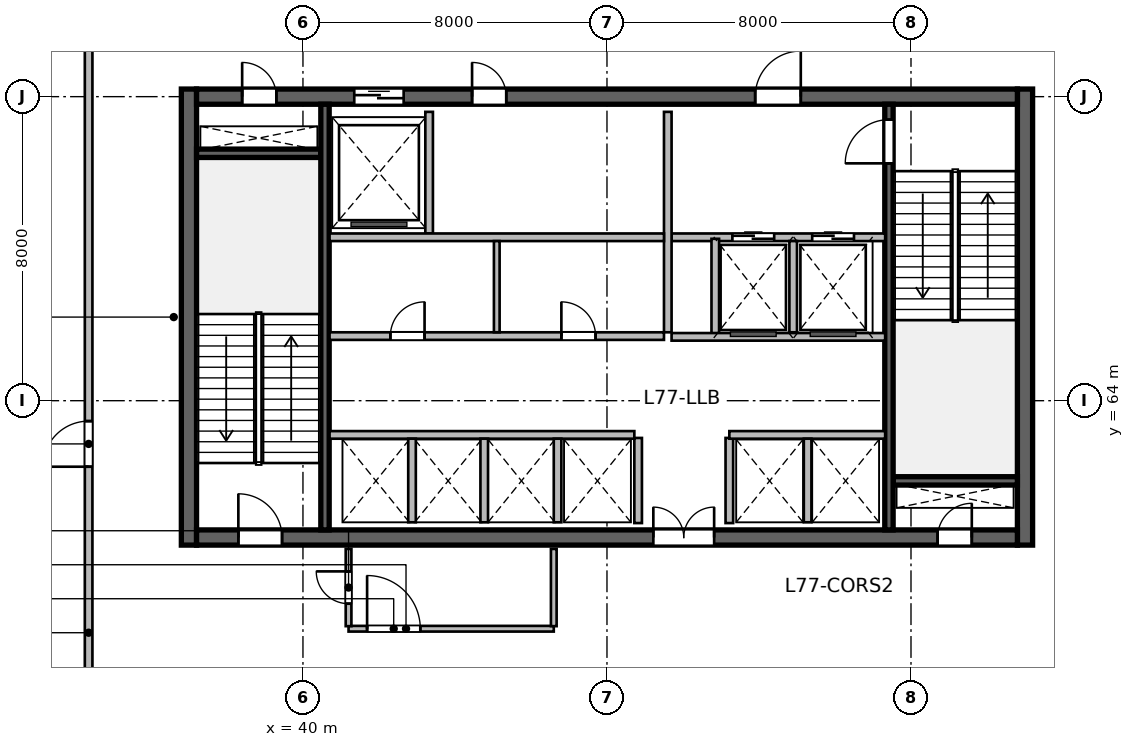
"""IFC4 building model, lengths in metres.
Left out: names, types, materials, properties, quantities, classifications, styles, units other than length and angle.
Written with IfcOpenShell. Run it as: python <this file> out.ifc"""

import sys

from ifc_helpers import new_model, si_unit, direction, frame, frame_2d, origin, place, context, subcontext, project, spatial, rectangle, extrude, source, transform, mapped, element, fill, save


model = new_model("IFC4")
c1 = context("Model", 3, precision=1e-05, world=origin(), true_north=direction((0.0, 1.0)))
c2 = subcontext(c1, "Body", "Model", "MODEL_VIEW")
j1 = project(units=[si_unit("LENGTHUNIT", "METRE"), si_unit("PLANEANGLEUNIT", "RADIAN")], contexts=[c1])
p1 = place(None, origin())
s1 = spatial("IfcSite", under=j1, at=p1, CompositionType="ELEMENT")
p2 = place(p1, origin())
s2 = spatial("IfcBuilding", under=s1, at=p2, CompositionType="ELEMENT")
p3 = place(p2, frame((0.0, 0.0, 318.0)))
s3 = spatial("IfcBuildingStorey", under=s2, at=p3, CompositionType="ELEMENT", Elevation=318.0)
m1 = source(origin(), c2, "Body", "SweptSolid", [
    extrude(rectangle(XDim=12.0, YDim=0.4, at=frame_2d((6.0, 0.0))), origin(), (0.0, 0.0, 1.0), 5.4),
])
for number, where, z_axis, x_axis in (
    (1, (37.0, 60.2, 0.0), (0.0, 0.0, 1.0), (0.0, 1.0, 0.0)),
    (2, (59.0, 60.2, 0.0), (0.0, 0.0, 1.0), (0.0, 1.0, 0.0)),
):
    element("IfcWall", number, at=place(p3, frame(where, z_axis=z_axis, x_axis=x_axis)), inside=s3, PredefinedType="SHEAR", context=c2, shape_type="MappedRepresentation", body=[
        mapped(m1, transform((0.0, 0.0, 0.0), scale=1.0)),
    ])
m2 = source(origin(), c2, "Body", "SweptSolid", [
    extrude(rectangle(XDim=21.6, YDim=0.4, at=frame_2d((10.8, 0.0))), origin(), (0.0, 0.0, 1.0), 5.4),
])
p4 = place(p3, frame((37.2, 60.4, 0.0), z_axis=(0.0, 0.0, 1.0), x_axis=(1.0, 0.0, 0.0)))
e3 = element("IfcWall", 3, at=p4, inside=s3, PredefinedType="SHEAR", context=c2, shape_type="MappedRepresentation", body=[
    mapped(m2, transform((0.0, 0.0, 0.0), scale=1.0)),
])
p5 = place(p4, frame((1.1, 0.0, 0.0)))
e4 = element("IfcOpeningElement", 4, at=p5, cuts=e3, PredefinedType="OPENING", context=c2, shape_type="SweptSolid", body=[
    extrude(rectangle(XDim=1.15, YDim=2.15, at=frame_2d((0.575, 1.075))), frame((0.0, 0.21, 0.0), z_axis=(0.0, -1.0, 0.0), x_axis=(1.0, 0.0, 0.0)), (0.0, 0.0, 1.0), 0.42),
])
p6 = place(p4, frame((19.5, 0.0, 0.0)))
e5 = element("IfcOpeningElement", 5, at=p6, cuts=e3, PredefinedType="OPENING", context=c2, shape_type="SweptSolid", body=[
    extrude(rectangle(XDim=0.9, YDim=2.1, at=frame_2d((0.45, 1.05))), frame((0.0, 0.21, 0.0), z_axis=(0.0, -1.0, 0.0), x_axis=(1.0, 0.0, 0.0)), (0.0, 0.0, 1.0), 0.42),
])
p7 = place(p4, frame((12.02, 0.0, 0.0)))
e6 = element("IfcOpeningElement", 6, at=p7, cuts=e3, PredefinedType="OPENING", context=c2, shape_type="SweptSolid", body=[
    extrude(rectangle(XDim=1.6, YDim=2.15, at=frame_2d((0.8, 1.075))), frame((0.0, 0.21, 0.0), z_axis=(0.0, -1.0, 0.0), x_axis=(1.0, 0.0, 0.0)), (0.0, 0.0, 1.0), 0.42),
])
p8 = place(p3, frame((37.2, 72.0, 0.0), z_axis=(0.0, 0.0, 1.0), x_axis=(1.0, 0.0, 0.0)))
e7 = element("IfcWall", 7, at=p8, inside=s3, PredefinedType="SHEAR", context=c2, shape_type="MappedRepresentation", body=[
    mapped(m2, transform((0.0, 0.0, 0.0), scale=1.0)),
])
p9 = place(p8, frame((1.2, 0.0, 0.0)))
e8 = element("IfcOpeningElement", 8, at=p9, cuts=e7, PredefinedType="OPENING", context=c2, shape_type="SweptSolid", body=[
    extrude(rectangle(XDim=0.9, YDim=2.1, at=frame_2d((0.45, 1.05))), frame((0.0, 0.21, 0.0), z_axis=(0.0, -1.0, 0.0), x_axis=(1.0, 0.0, 0.0)), (0.0, 0.0, 1.0), 0.42),
])
p10 = place(p8, frame((14.7, 0.0, 0.0)))
e9 = element("IfcOpeningElement", 9, at=p10, cuts=e7, PredefinedType="OPENING", context=c2, shape_type="SweptSolid", body=[
    extrude(rectangle(XDim=1.2, YDim=2.15, at=frame_2d((0.6, 1.075))), frame((0.0, 0.21, 0.0), z_axis=(0.0, -1.0, 0.0), x_axis=(1.0, 0.0, 0.0)), (0.0, 0.0, 1.0), 0.42),
])
p11 = place(p8, frame((4.15, 0.0, 0.0)))
e10 = element("IfcOpeningElement", 10, at=p11, cuts=e7, PredefinedType="OPENING", context=c2, shape_type="SweptSolid", body=[
    extrude(rectangle(XDim=1.3, YDim=2.15, at=frame_2d((0.65, 1.075))), frame((0.0, 0.21, 0.0), z_axis=(0.0, -1.0, 0.0), x_axis=(1.0, 0.0, 0.0)), (0.0, 0.0, 1.0), 0.42),
])
p12 = place(p8, frame((7.25, 0.0, 0.0)))
e11 = element("IfcOpeningElement", 11, at=p12, cuts=e7, PredefinedType="OPENING", context=c2, shape_type="SweptSolid", body=[
    extrude(rectangle(XDim=0.9, YDim=2.1, at=frame_2d((0.45, 1.05))), frame((0.0, 0.21, 0.0), z_axis=(0.0, -1.0, 0.0), x_axis=(1.0, 0.0, 0.0)), (0.0, 0.0, 1.0), 0.42),
])
m3 = source(origin(), c2, "Body", "SweptSolid", [
    extrude(rectangle(XDim=3.27, YDim=0.22, at=frame_2d((1.635, 0.0))), origin(), (0.0, 0.0, 1.0), 5.4),
])
for number, where, z_axis, x_axis in (
    (12, (37.2, 70.51, 0.0), (0.0, 0.0, 1.0), (1.0, 0.0, 0.0)),
    (13, (55.53, 61.89, 0.0), (0.0, 0.0, 1.0), (1.0, 0.0, 0.0)),
):
    element("IfcWall", number, at=place(p3, frame(where, z_axis=z_axis, x_axis=x_axis)), inside=s3, PredefinedType="SHEAR", context=c2, shape_type="MappedRepresentation", body=[
        mapped(m3, transform((0.0, 0.0, 0.0), scale=1.0)),
    ])
m4 = source(origin(), c2, "Body", "SweptSolid", [
    extrude(rectangle(XDim=11.2, YDim=0.22, at=frame_2d((5.6, 0.0))), origin(), (0.0, 0.0, 1.0), 5.4),
])
p13 = place(p3, frame((40.58, 60.6, 0.0), z_axis=(0.0, 0.0, 1.0), x_axis=(0.0, 1.0, 0.0)))
e14 = element("IfcWall", 14, at=p13, inside=s3, PredefinedType="SHEAR", context=c2, shape_type="MappedRepresentation", body=[
    mapped(m4, transform((0.0, 0.0, 0.0), scale=1.0)),
])
p14 = place(p3, frame((55.42, 60.6, 0.0), z_axis=(0.0, 0.0, 1.0), x_axis=(0.0, 1.0, 0.0)))
e15 = element("IfcWall", 15, at=p14, inside=s3, PredefinedType="SHEAR", context=c2, shape_type="MappedRepresentation", body=[
    mapped(m4, transform((0.0, 0.0, 0.0), scale=1.0)),
])
p15 = place(p14, frame((9.645, 0.0, 0.0)))
e16 = element("IfcOpeningElement", 16, at=p15, cuts=e15, PredefinedType="OPENING", context=c2, shape_type="SweptSolid", body=[
    extrude(rectangle(XDim=1.15, YDim=2.15, at=frame_2d((0.575, 1.075))), frame((0.0, 0.12, 0.0), z_axis=(0.0, -1.0, 0.0), x_axis=(1.0, 0.0, 0.0)), (0.0, 0.0, 1.0), 0.24),
])
m5 = source(origin(), c2, "Body", "SweptSolid", [
    extrude(rectangle(XDim=1.972, YDim=0.3, at=frame_2d((0.986, 0.0))), origin(), (0.0, 0.0, 1.0), 5.12),
])
p16 = place(p3, frame((31.648, 72.758, 0.0), z_axis=(0.0, 0.0, 1.0), x_axis=(0.878387239208, 0.477949639603, 0.0)))
e17 = element("IfcWall", 17, at=p16, inside=s3, PredefinedType="SOLIDWALL", context=c2, shape_type="MappedRepresentation", body=[
    mapped(m5, transform((0.0, 0.0, 0.0), scale=1.0)),
])
m6 = source(origin(), c2, "Body", "SweptSolid", [
    extrude(rectangle(XDim=2.24, YDim=0.2, at=frame_2d((1.12, 0.0))), origin(), (0.0, 0.0, 1.0), 5.12),
])
for number, where, z_axis, x_axis in (
    (18, (48.82, 60.78, 0.0), (0.0, 0.0, 1.0), (0.0, 1.0, 0.0)),
    (19, (51.22, 60.78, 0.0), (0.0, 0.0, 1.0), (0.0, 1.0, 0.0)),
):
    element("IfcWall", number, at=place(p3, frame(where, z_axis=z_axis, x_axis=x_axis)), inside=s3, PredefinedType="SOLIDWALL", context=c2, shape_type="MappedRepresentation", body=[
        mapped(m6, transform((0.0, 0.0, 0.0), scale=1.0)),
    ])
m7 = source(origin(), c2, "Body", "SweptSolid", [
    extrude(rectangle(XDim=5.62, YDim=0.2, at=frame_2d((2.81, 0.0))), origin(), (0.0, 0.0, 1.0), 5.12),
])
p17 = place(p3, frame((49.7, 68.3, 0.0), z_axis=(0.0, 0.0, 1.0), x_axis=(1.0, 0.0, 0.0)))
e20 = element("IfcWall", 20, at=p17, inside=s3, PredefinedType="SOLIDWALL", context=c2, shape_type="MappedRepresentation", body=[
    mapped(m7, transform((0.0, 0.0, 0.0), scale=1.0)),
])
p18 = place(p17, frame((1.6, 0.0, 0.0)))
e21 = element("IfcOpeningElement", 21, at=p18, cuts=e20, PredefinedType="OPENING", context=c2, shape_type="SweptSolid", body=[
    extrude(rectangle(XDim=1.1, YDim=2.15, at=frame_2d((0.55, 1.075))), frame((0.0, 0.11, 0.0), z_axis=(0.0, -1.0, 0.0), x_axis=(1.0, 0.0, 0.0)), (0.0, 0.0, 1.0), 0.22),
])
p19 = place(p17, frame((3.7, 0.0, 0.0)))
e22 = element("IfcOpeningElement", 22, at=p19, cuts=e20, PredefinedType="OPENING", context=c2, shape_type="SweptSolid", body=[
    extrude(rectangle(XDim=1.1, YDim=2.15, at=frame_2d((0.55, 1.075))), frame((0.0, 0.11, 0.0), z_axis=(0.0, -1.0, 0.0), x_axis=(1.0, 0.0, 0.0)), (0.0, 0.0, 1.0), 0.22),
])
m8 = source(origin(), c2, "Body", "SweptSolid", [
    extrude(rectangle(XDim=5.8, YDim=0.2, at=frame_2d((2.9, 0.0))), origin(), (0.0, 0.0, 1.0), 5.12),
])
p20 = place(p3, frame((49.6, 65.8, 0.0), z_axis=(0.0, 0.0, 1.0), x_axis=(0.0, 1.0, 0.0)))
e23 = element("IfcWall", 23, at=p20, inside=s3, PredefinedType="SOLIDWALL", context=c2, shape_type="MappedRepresentation", body=[
    mapped(m8, transform((0.0, 0.0, 0.0), scale=1.0)),
])
m9 = source(origin(), c2, "Body", "SweptSolid", [
    extrude(rectangle(XDim=2.58, YDim=0.2, at=frame_2d((1.29, 0.0))), origin(), (0.0, 0.0, 1.0), 5.12),
])
p21 = place(p3, frame((50.85, 65.68, 0.0), z_axis=(0.0, 0.0, 1.0), x_axis=(0.0, 1.0, 0.0)))
e24 = element("IfcWall", 24, at=p21, inside=s3, PredefinedType="SOLIDWALL", context=c2, shape_type="MappedRepresentation", body=[
    mapped(m9, transform((0.0, 0.0, 0.0), scale=1.0)),
])
m10 = source(origin(), c2, "Body", "SweptSolid", [
    extrude(rectangle(XDim=2.4, YDim=0.2, at=frame_2d((1.2, 0.0))), origin(), (0.0, 0.0, 1.0), 5.12),
])
p22 = place(p3, frame((52.9, 65.8, 0.0), z_axis=(0.0, 0.0, 1.0), x_axis=(0.0, 1.0, 0.0)))
e25 = element("IfcWall", 25, at=p22, inside=s3, PredefinedType="SOLIDWALL", context=c2, shape_type="MappedRepresentation", body=[
    mapped(m10, transform((0.0, 0.0, 0.0), scale=1.0)),
])
p23 = place(p3, frame((49.7, 65.68, 0.0), z_axis=(0.0, 0.0, 1.0), x_axis=(1.0, 0.0, 0.0)))
e26 = element("IfcWall", 26, at=p23, inside=s3, PredefinedType="SOLIDWALL", context=c2, shape_type="MappedRepresentation", body=[
    mapped(m7, transform((0.0, 0.0, 0.0), scale=1.0)),
])
m11 = source(origin(), c2, "Body", "SweptSolid", [
    extrude(rectangle(XDim=3.2, YDim=0.2, at=frame_2d((1.6, 0.0))), origin(), (0.0, 0.0, 1.0), 5.12),
])
p24 = place(p3, frame((43.32, 68.4, 0.0), z_axis=(0.0, 0.0, 1.0), x_axis=(0.0, 1.0, 0.0)))
e27 = element("IfcWall", 27, at=p24, inside=s3, PredefinedType="SOLIDWALL", context=c2, shape_type="MappedRepresentation", body=[
    mapped(m11, transform((0.0, 0.0, 0.0), scale=1.0)),
])
m12 = source(origin(), c2, "Body", "SweptSolid", [
    extrude(rectangle(XDim=8.8, YDim=0.2, at=frame_2d((4.4, 0.0))), origin(), (0.0, 0.0, 1.0), 5.12),
])
p25 = place(p3, frame((40.7, 68.3, 0.0), z_axis=(0.0, 0.0, 1.0), x_axis=(1.0, 0.0, 0.0)))
e28 = element("IfcWall", 28, at=p25, inside=s3, PredefinedType="SOLIDWALL", context=c2, shape_type="MappedRepresentation", body=[
    mapped(m12, transform((0.0, 0.0, 0.0), scale=1.0)),
])
m13 = source(origin(), c2, "Body", "SweptSolid", [
    extrude(rectangle(XDim=8.02, YDim=0.2, at=frame_2d((4.01, 0.0))), origin(), (0.0, 0.0, 1.0), 5.12),
])
p26 = place(p3, frame((40.7, 63.1, 0.0), z_axis=(0.0, 0.0, 1.0), x_axis=(1.0, 0.0, 0.0)))
e29 = element("IfcWall", 29, at=p26, inside=s3, PredefinedType="SOLIDWALL", context=c2, shape_type="MappedRepresentation", body=[
    mapped(m13, transform((0.0, 0.0, 0.0), scale=1.0)),
])
m14 = source(origin(), c2, "Body", "SweptSolid", [
    extrude(rectangle(XDim=4.1, YDim=0.2, at=frame_2d((2.05, 0.0))), origin(), (0.0, 0.0, 1.0), 5.12),
])
p27 = place(p3, frame((51.22, 63.1, 0.0), z_axis=(0.0, 0.0, 1.0), x_axis=(1.0, 0.0, 0.0)))
e30 = element("IfcWall", 30, at=p27, inside=s3, PredefinedType="SOLIDWALL", context=c2, shape_type="MappedRepresentation", body=[
    mapped(m14, transform((0.0, 0.0, 0.0), scale=1.0)),
])
m15 = source(origin(), c2, "Body", "SweptSolid", [
    extrude(rectangle(XDim=2.2, YDim=0.2, at=frame_2d((1.1, 0.0))), origin(), (0.0, 0.0, 1.0), 5.12),
])
for number, where, z_axis, x_axis in (
    (31, (42.87, 60.8, 0.0), (0.0, 0.0, 1.0), (0.0, 1.0, 0.0)),
    (32, (44.77, 60.8, 0.0), (0.0, 0.0, 1.0), (0.0, 1.0, 0.0)),
    (33, (46.7, 60.8, 0.0), (0.0, 0.0, 1.0), (0.0, 1.0, 0.0)),
    (34, (53.28, 60.8, 0.0), (0.0, 0.0, 1.0), (0.0, 1.0, 0.0)),
):
    element("IfcWall", number, at=place(p3, frame(where, z_axis=z_axis, x_axis=x_axis)), inside=s3, PredefinedType="SOLIDWALL", context=c2, shape_type="MappedRepresentation", body=[
        mapped(m15, transform((0.0, 0.0, 0.0), scale=1.0)),
    ])
p28 = place(p3, frame((40.7, 65.7, 0.0), z_axis=(0.0, 0.0, 1.0), x_axis=(1.0, 0.0, 0.0)))
e35 = element("IfcWall", 35, at=p28, inside=s3, PredefinedType="SOLIDWALL", context=c2, shape_type="MappedRepresentation", body=[
    mapped(m12, transform((0.0, 0.0, 0.0), scale=1.0)),
])
p29 = place(p28, frame((1.6, 0.0, 0.0)))
e36 = element("IfcOpeningElement", 36, at=p29, cuts=e35, PredefinedType="OPENING", context=c2, shape_type="SweptSolid", body=[
    extrude(rectangle(XDim=0.9, YDim=2.1, at=frame_2d((0.45, 1.05))), frame((0.0, 0.11, 0.0), z_axis=(0.0, -1.0, 0.0), x_axis=(1.0, 0.0, 0.0)), (0.0, 0.0, 1.0), 0.22),
])
p30 = place(p28, frame((6.1, 0.0, 0.0)))
e37 = element("IfcOpeningElement", 37, at=p30, cuts=e35, PredefinedType="OPENING", context=c2, shape_type="SweptSolid", body=[
    extrude(rectangle(XDim=0.9, YDim=2.1, at=frame_2d((0.45, 1.05))), frame((0.0, 0.11, 0.0), z_axis=(0.0, -1.0, 0.0), x_axis=(1.0, 0.0, 0.0)), (0.0, 0.0, 1.0), 0.22),
])
m16 = source(origin(), c2, "Body", "SweptSolid", [
    extrude(rectangle(XDim=2.4, YDim=0.15, at=frame_2d((1.2, 0.0))), origin(), (0.0, 0.0, 1.0), 5.12),
])
p31 = place(p3, frame((45.1, 65.8, 0.0), z_axis=(0.0, 0.0, 1.0), x_axis=(0.0, 1.0, 0.0)))
e38 = element("IfcWall", 38, at=p31, inside=s3, PredefinedType="PARTITIONING", context=c2, shape_type="MappedRepresentation", body=[
    mapped(m16, transform((0.0, 0.0, 0.0), scale=1.0)),
])
m17 = source(origin(), c2, "Body", "SweptSolid", [
    extrude(rectangle(XDim=5.4, YDim=0.15, at=frame_2d((2.7, 0.0))), origin(), (0.0, 0.0, 1.0), 5.12),
])
p32 = place(p3, frame((41.2, 58.0, 0.0), z_axis=(0.0, 0.0, 1.0), x_axis=(1.0, 0.0, 0.0)))
e39 = element("IfcWall", 39, at=p32, inside=s3, PredefinedType="PARTITIONING", context=c2, shape_type="MappedRepresentation", body=[
    mapped(m17, transform((0.0, 0.0, 0.0), scale=1.0)),
])
p33 = place(p32, frame((0.488, 0.0, 0.0)))
e40 = element("IfcOpeningElement", 40, at=p33, cuts=e39, PredefinedType="OPENING", context=c2, shape_type="SweptSolid", body=[
    extrude(rectangle(XDim=1.4, YDim=2.15, at=frame_2d((0.7, 1.075))), frame((0.0, 0.085, 0.0), z_axis=(0.0, -1.0, 0.0), x_axis=(1.0, 0.0, 0.0)), (0.0, 0.0, 1.0), 0.17),
])
m18 = source(origin(), c2, "Body", "SweptSolid", [
    extrude(rectangle(XDim=2.033, YDim=0.15, at=frame_2d((1.016, 0.0))), origin(), (0.0, 0.0, 1.0), 5.12),
])
p34 = place(p3, frame((41.2, 58.067, 0.0), z_axis=(0.0, 0.0, 1.0), x_axis=(0.0, 1.0, 0.0)))
e41 = element("IfcWall", 41, at=p34, inside=s3, PredefinedType="PARTITIONING", context=c2, shape_type="MappedRepresentation", body=[
    mapped(m18, transform((0.0, 0.0, 0.0), scale=1.0)),
])
p35 = place(p34, frame((0.591, 0.0, 0.0)))
e42 = element("IfcOpeningElement", 42, at=p35, cuts=e41, PredefinedType="OPENING", context=c2, shape_type="SweptSolid", body=[
    extrude(rectangle(XDim=0.85, YDim=2.1, at=frame_2d((0.425, 1.05))), frame((0.0, 0.085, 0.0), z_axis=(0.0, -1.0, 0.0), x_axis=(1.0, 0.0, 0.0)), (0.0, 0.0, 1.0), 0.17),
])
p36 = place(p3, frame((46.6, 58.067, 0.0), z_axis=(0.0, 0.0, 1.0), x_axis=(0.0, 1.0, 0.0)))
e43 = element("IfcWall", 43, at=p36, inside=s3, PredefinedType="PARTITIONING", context=c2, shape_type="MappedRepresentation", body=[
    mapped(m18, transform((0.0, 0.0, 0.0), scale=1.0)),
])
m19 = source(origin(), c2, "Body", "SweptSolid", [
    extrude(rectangle(XDim=22.582, YDim=0.2, at=frame_2d((11.291, 0.0))), origin(), (0.0, 0.0, 1.0), 5.12),
])
p37 = place(p3, frame((34.36, 51.572, 0.0), z_axis=(0.0, 0.0, 1.0), x_axis=(0.0, 1.0, 0.0)))
e44 = element("IfcWall", 44, at=p37, inside=s3, PredefinedType="SOLIDWALL", context=c2, shape_type="MappedRepresentation", body=[
    mapped(m19, transform((0.0, 0.0, 0.0), scale=1.0)),
])
p38 = place(p37, frame((10.691, 0.0, 0.0)))
e45 = element("IfcOpeningElement", 45, at=p38, cuts=e44, PredefinedType="OPENING", context=c2, shape_type="SweptSolid", body=[
    extrude(rectangle(XDim=1.2, YDim=2.15, at=frame_2d((0.6, 1.075))), frame((0.0, 0.11, 0.0), z_axis=(0.0, -1.0, 0.0), x_axis=(1.0, 0.0, 0.0)), (0.0, 0.0, 1.0), 0.22),
])
m20 = source(origin(), c2, "Body", "SweptSolid", [
    extrude(rectangle(XDim=1.15, YDim=2.15, at=frame_2d((0.575, 1.075))), frame((0.0, 0.025, 0.0), z_axis=(0.0, -1.0, 0.0), x_axis=(1.0, 0.0, 0.0)), (0.0, 0.0, 1.0), 0.05),
])
p39 = place(p5, origin())
e46 = element("IfcDoor", 46, at=p39, inside=s3, OperationType="SINGLE_SWING_LEFT", PredefinedType="DOOR", context=c2, shape_type="MappedRepresentation", body=[
    mapped(m20, transform((0.0, 0.0, 0.0), scale=1.0)),
])
fill(e4, e46)
m21 = source(origin(), c2, "Body", "SweptSolid", [
    extrude(rectangle(XDim=0.9, YDim=2.1, at=frame_2d((0.45, 1.05))), frame((0.0, 0.025, 0.0), z_axis=(0.0, -1.0, 0.0), x_axis=(1.0, 0.0, 0.0)), (0.0, 0.0, 1.0), 0.05),
])
p40 = place(p9, origin())
e47 = element("IfcDoor", 47, at=p40, inside=s3, OperationType="SINGLE_SWING_LEFT", PredefinedType="DOOR", context=c2, shape_type="MappedRepresentation", body=[
    mapped(m21, transform((0.0, 0.0, 0.0), scale=1.0)),
])
fill(e8, e47)
p41 = place(p6, origin())
e48 = element("IfcDoor", 48, at=p41, inside=s3, OperationType="SINGLE_SWING_RIGHT", PredefinedType="DOOR", context=c2, shape_type="MappedRepresentation", body=[
    mapped(m21, transform((0.0, 0.0, 0.0), scale=1.0)),
])
fill(e5, e48)
p42 = place(p15, origin())
e49 = element("IfcDoor", 49, at=p42, inside=s3, OperationType="SINGLE_SWING_LEFT", PredefinedType="DOOR", context=c2, shape_type="MappedRepresentation", body=[
    mapped(m20, transform((0.0, 0.0, 0.0), scale=1.0)),
])
fill(e16, e49)
m22 = source(origin(), c2, "Body", "SweptSolid", [
    extrude(rectangle(XDim=1.6, YDim=2.15, at=frame_2d((0.8, 1.075))), frame((0.0, 0.025, 0.0), z_axis=(0.0, -1.0, 0.0), x_axis=(1.0, 0.0, 0.0)), (0.0, 0.0, 1.0), 0.05),
])
p43 = place(p7, origin())
e50 = element("IfcDoor", 50, at=p43, inside=s3, OperationType="DOUBLE_DOOR_SINGLE_SWING", PredefinedType="DOOR", context=c2, shape_type="MappedRepresentation", body=[
    mapped(m22, transform((0.0, 0.0, 0.0), scale=1.0)),
])
fill(e6, e50)
m23 = source(origin(), c2, "Body", "SweptSolid", [
    extrude(rectangle(XDim=1.2, YDim=2.15, at=frame_2d((0.6, 1.075))), frame((0.0, 0.025, 0.0), z_axis=(0.0, -1.0, 0.0), x_axis=(1.0, 0.0, 0.0)), (0.0, 0.0, 1.0), 0.05),
])
p44 = place(p10, origin())
e51 = element("IfcDoor", 51, at=p44, inside=s3, OperationType="SINGLE_SWING_RIGHT", PredefinedType="DOOR", context=c2, shape_type="MappedRepresentation", body=[
    mapped(m23, transform((0.0, 0.0, 0.0), scale=1.0)),
])
fill(e9, e51)
m24 = source(origin(), c2, "Body", "SweptSolid", [
    extrude(rectangle(XDim=1.1, YDim=2.15, at=frame_2d((0.55, 1.075))), frame((0.0, 0.025, 0.0), z_axis=(0.0, -1.0, 0.0), x_axis=(1.0, 0.0, 0.0)), (0.0, 0.0, 1.0), 0.05),
])
p45 = place(p18, origin())
e52 = element("IfcDoor", 52, at=p45, inside=s3, OperationType="DOUBLE_DOOR_SLIDING", PredefinedType="DOOR", context=c2, shape_type="MappedRepresentation", body=[
    mapped(m24, transform((0.0, 0.0, 0.0), scale=1.0)),
])
fill(e21, e52)
p46 = place(p19, origin())
e53 = element("IfcDoor", 53, at=p46, inside=s3, OperationType="DOUBLE_DOOR_SLIDING", PredefinedType="DOOR", context=c2, shape_type="MappedRepresentation", body=[
    mapped(m24, transform((0.0, 0.0, 0.0), scale=1.0)),
])
fill(e22, e53)
m25 = source(origin(), c2, "Body", "SweptSolid", [
    extrude(rectangle(XDim=1.3, YDim=2.15, at=frame_2d((0.65, 1.075))), frame((0.0, 0.025, 0.0), z_axis=(0.0, -1.0, 0.0), x_axis=(1.0, 0.0, 0.0)), (0.0, 0.0, 1.0), 0.05),
])
p47 = place(p11, origin())
e54 = element("IfcDoor", 54, at=p47, inside=s3, OperationType="DOUBLE_DOOR_SLIDING", PredefinedType="DOOR", context=c2, shape_type="MappedRepresentation", body=[
    mapped(m25, transform((0.0, 0.0, 0.0), scale=1.0)),
])
fill(e10, e54)
p48 = place(p12, origin())
e55 = element("IfcDoor", 55, at=p48, inside=s3, OperationType="SINGLE_SWING_LEFT", PredefinedType="DOOR", context=c2, shape_type="MappedRepresentation", body=[
    mapped(m21, transform((0.0, 0.0, 0.0), scale=1.0)),
])
fill(e11, e55)
p49 = place(p29, origin())
e56 = element("IfcDoor", 56, at=p49, inside=s3, OperationType="SINGLE_SWING_RIGHT", PredefinedType="DOOR", context=c2, shape_type="MappedRepresentation", body=[
    mapped(m21, transform((0.0, 0.0, 0.0), scale=1.0)),
])
fill(e36, e56)
p50 = place(p30, origin())
e57 = element("IfcDoor", 57, at=p50, inside=s3, OperationType="SINGLE_SWING_LEFT", PredefinedType="DOOR", context=c2, shape_type="MappedRepresentation", body=[
    mapped(m21, transform((0.0, 0.0, 0.0), scale=1.0)),
])
fill(e37, e57)
m26 = source(origin(), c2, "Body", "SweptSolid", [
    extrude(rectangle(XDim=0.85, YDim=2.1, at=frame_2d((0.425, 1.05))), frame((0.0, 0.025, 0.0), z_axis=(0.0, -1.0, 0.0), x_axis=(1.0, 0.0, 0.0)), (0.0, 0.0, 1.0), 0.05),
])
p51 = place(p35, origin())
e58 = element("IfcDoor", 58, at=p51, inside=s3, OperationType="SINGLE_SWING_RIGHT", PredefinedType="DOOR", context=c2, shape_type="MappedRepresentation", body=[
    mapped(m26, transform((0.0, 0.0, 0.0), scale=1.0)),
])
fill(e42, e58)
p52 = place(p38, origin())
e59 = element("IfcDoor", 59, at=p52, inside=s3, OperationType="SINGLE_SWING_LEFT", PredefinedType="DOOR", context=c2, shape_type="MappedRepresentation", body=[
    mapped(m23, transform((0.0, 0.0, 0.0), scale=1.0)),
])
fill(e45, e59)
m27 = source(origin(), c2, "Body", "SweptSolid", [
    extrude(rectangle(XDim=1.4, YDim=2.15, at=frame_2d((0.7, 1.075))), frame((0.0, 0.025, 0.0), z_axis=(0.0, -1.0, 0.0), x_axis=(1.0, 0.0, 0.0)), (0.0, 0.0, 1.0), 0.05),
])
p53 = place(p33, origin())
e60 = element("IfcDoor", 60, at=p53, inside=s3, OperationType="SINGLE_SWING_LEFT", PredefinedType="DOOR", context=c2, shape_type="MappedRepresentation", body=[
    mapped(m27, transform((0.0, 0.0, 0.0), scale=1.0)),
])
fill(e40, e60)
save(model, sys.argv[1])
